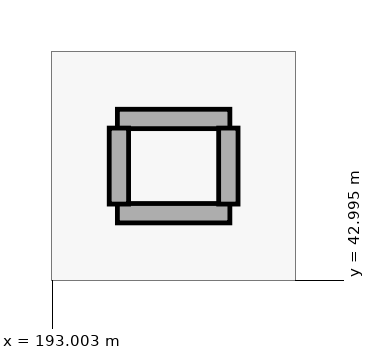
"""IFC4 building model, lengths in metres.
Left out: names, types, materials, properties, quantities, classifications, styles, units other than length and angle.
Written with IfcOpenShell. Run it as: python <this file> out.ifc"""

import sys

from ifc_helpers import new_model, si_unit, direction, frame, frame_2d, origin, place, context, subcontext, project, spatial, rectangle, extrude, element, save


model = new_model("IFC4")
c1 = context("Model", 3, precision=1e-05, world=origin(), true_north=direction((0.0, 1.0)))
c2 = subcontext(c1, "Body", "Model", "MODEL_VIEW")
j1 = project(units=[si_unit("LENGTHUNIT", "METRE"), si_unit("PLANEANGLEUNIT", "RADIAN")], contexts=[c1])
p1 = place(None, origin())
s1 = spatial("IfcSite", under=j1, at=p1, CompositionType="ELEMENT")
p2 = place(p1, origin())
s2 = spatial("IfcBuilding", under=s1, at=p2, CompositionType="ELEMENT")
p3 = place(p2, frame((0.0, 0.0, 5.4)))
s3 = spatial("IfcBuildingStorey", under=s2, at=p3, CompositionType="ELEMENT", Elevation=5.4)
for number, where, z_axis, x_axis in (
    (1, (193.86, 45.12, 0.0), (0.0, 0.0, 1.0), (1.0, 0.0, 0.0)),
    (2, (193.86, 43.88, 0.0), (0.0, 0.0, 1.0), (1.0, 0.0, 0.0)),
):
    element("IfcWall", number, at=place(p3, frame(where, z_axis=z_axis, x_axis=x_axis)), inside=s3, PredefinedType="PARTITIONING", context=c2, shape_type="SweptSolid", body=[
        extrude(rectangle(XDim=1.48, YDim=0.255, at=frame_2d((0.74, 0.0))), origin(), (0.0, 0.0, 1.0), 4.72),
    ])
for number, where, z_axis, x_axis in (
    (3, (193.88, 44.0, 0.0), (0.0, 0.0, 1.0), (0.0, 1.0, 0.0)),
    (4, (195.32, 44.0, 0.0), (0.0, 0.0, 1.0), (0.0, 1.0, 0.0)),
):
    element("IfcWall", number, at=place(p3, frame(where, z_axis=z_axis, x_axis=x_axis)), inside=s3, PredefinedType="PARTITIONING", context=c2, shape_type="SweptSolid", body=[
        extrude(rectangle(XDim=1.0, YDim=0.255, at=frame_2d((0.5, 0.0))), origin(), (0.0, 0.0, 1.0), 4.72),
    ])
save(model, sys.argv[1])
